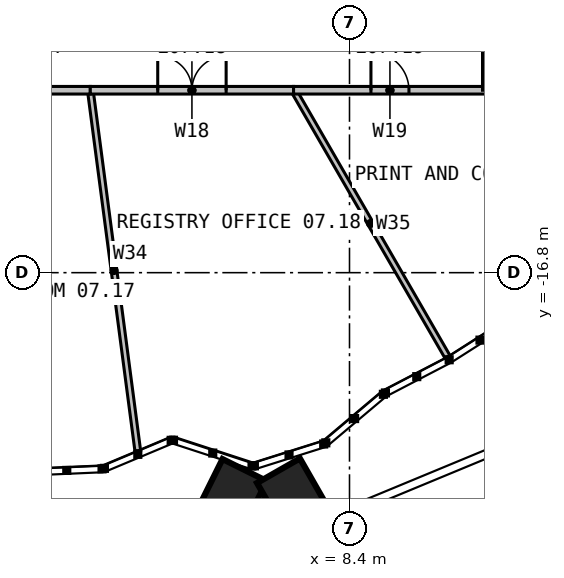
"""IFC4 building model, lengths in metres.
Left out: names, types, materials, properties, quantities, classifications, styles, units other than length and angle.
Written with IfcOpenShell. Run it as: python <this file> out.ifc"""

import sys

from ifc_helpers import new_model, si_unit, direction, frame, frame_2d, origin, place, context, subcontext, project, spatial, rectangle, extrude, element, fill, save


model = new_model("IFC4")
c1 = context("Model", 3, precision=1e-05, world=origin(), true_north=direction((0.0, 1.0)))
c2 = subcontext(c1, "Body", "Model", "MODEL_VIEW")
j1 = project(units=[si_unit("LENGTHUNIT", "METRE"), si_unit("PLANEANGLEUNIT", "RADIAN")], contexts=[c1])
p1 = place(None, origin())
s1 = spatial("IfcSite", under=j1, at=p1, CompositionType="ELEMENT")
p2 = place(p1, origin())
s2 = spatial("IfcBuilding", under=s1, at=p2, CompositionType="ELEMENT")
p3 = place(p2, frame((0.0, 0.0, 33.0)))
s3 = spatial("IfcBuildingStorey", under=s2, at=p3, CompositionType="ELEMENT", Elevation=33.0)
p4 = place(p3, frame((1.58, -12.0, 0.0), z_axis=(0.0, 0.0, 1.0), x_axis=(0.130533729477, -0.991443869046, 0.0)))
e1 = element("IfcWall", 1, at=p4, inside=s3, PredefinedType="PARTITIONING", context=c2, shape_type="SweptSolid", body=[
    extrude(rectangle(XDim=9.567, YDim=0.15, at=frame_2d((4.783, 0.0))), origin(), (0.0, 0.0, 1.0), 2.79),
])
p5 = place(p3, frame((6.928, -12.0, 0.0), z_axis=(0.0, 0.0, 1.0), x_axis=(0.500007814618, -0.866020891966, 0.0)))
e2 = element("IfcWall", 2, at=p5, inside=s3, PredefinedType="PARTITIONING", context=c2, shape_type="SweptSolid", body=[
    extrude(rectangle(XDim=8.097, YDim=0.15, at=frame_2d((4.048, 0.0))), origin(), (0.0, 0.0, 1.0), 2.79),
])
p6 = place(p3, frame((-1.58, -12.0, 0.0), z_axis=(0.0, 0.0, 1.0), x_axis=(1.0, 0.0, 0.0)))
e3 = element("IfcWall", 3, at=p6, inside=s3, PredefinedType="PARTITIONING", context=c2, shape_type="SweptSolid", body=[
    extrude(rectangle(XDim=3.16, YDim=0.2, at=frame_2d((1.58, 0.0))), origin(), (0.0, 0.0, 1.0), 3.8),
])
p7 = place(p6, frame((1.08, 0.0, 0.0)))
e4 = element("IfcOpeningElement", 4, at=p7, cuts=e3, PredefinedType="OPENING", context=c2, shape_type="SweptSolid", body=[
    extrude(rectangle(XDim=1.0, YDim=2.2, at=frame_2d((0.5, 1.1))), frame((0.0, 0.11, 0.0), z_axis=(0.0, -1.0, 0.0), x_axis=(1.0, 0.0, 0.0)), (0.0, 0.0, 1.0), 0.22),
])
p8 = place(p3, frame((1.58, -12.0, 0.0), z_axis=(0.0, 0.0, 1.0), x_axis=(1.0, 0.0, 0.0)))
e5 = element("IfcWall", 5, at=p8, inside=s3, PredefinedType="PARTITIONING", context=c2, shape_type="SweptSolid", body=[
    extrude(rectangle(XDim=5.348, YDim=0.2, at=frame_2d((2.674, 0.0))), origin(), (0.0, 0.0, 1.0), 3.8),
])
p9 = place(p8, frame((1.774, 0.0, 0.0)))
e6 = element("IfcOpeningElement", 6, at=p9, cuts=e5, PredefinedType="OPENING", context=c2, shape_type="SweptSolid", body=[
    extrude(rectangle(XDim=1.8, YDim=2.2, at=frame_2d((0.9, 1.1))), frame((0.0, 0.11, 0.0), z_axis=(0.0, -1.0, 0.0), x_axis=(1.0, 0.0, 0.0)), (0.0, 0.0, 1.0), 0.22),
])
p10 = place(p3, frame((6.928, -12.0, 0.0), z_axis=(0.0, 0.0, 1.0), x_axis=(1.0, 0.0, 0.0)))
e7 = element("IfcWall", 7, at=p10, inside=s3, PredefinedType="PARTITIONING", context=c2, shape_type="SweptSolid", body=[
    extrude(rectangle(XDim=5.072, YDim=0.2, at=frame_2d((2.536, 0.0))), origin(), (0.0, 0.0, 1.0), 3.8),
])
p11 = place(p10, frame((2.036, 0.0, 0.0)))
e8 = element("IfcOpeningElement", 8, at=p11, cuts=e7, PredefinedType="OPENING", context=c2, shape_type="SweptSolid", body=[
    extrude(rectangle(XDim=1.0, YDim=2.2, at=frame_2d((0.5, 1.1))), frame((0.0, 0.11, 0.0), z_axis=(0.0, -1.0, 0.0), x_axis=(1.0, 0.0, 0.0)), (0.0, 0.0, 1.0), 0.22),
])
p12 = place(p3, frame((12.0, -12.0, 0.0), z_axis=(0.0, 0.0, 1.0), x_axis=(0.0, 1.0, 0.0)))
e9 = element("IfcWall", 9, at=p12, inside=s3, PredefinedType="PARTITIONING", context=c2, shape_type="SweptSolid", body=[
    extrude(rectangle(XDim=2.792, YDim=0.2, at=frame_2d((1.396, 0.0))), origin(), (0.0, 0.0, 1.0), 3.8),
])
p13 = place(p9, origin())
e10 = element("IfcDoor", 10, at=p13, inside=s3, OperationType="DOUBLE_DOOR_SINGLE_SWING", PredefinedType="DOOR", context=c2, shape_type="SweptSolid", body=[
    extrude(rectangle(XDim=1.8, YDim=2.2, at=frame_2d((0.9, 1.1))), frame((0.0, 0.025, 0.0), z_axis=(0.0, -1.0, 0.0), x_axis=(1.0, 0.0, 0.0)), (0.0, 0.0, 1.0), 0.05),
])
fill(e6, e10)
p14 = place(p11, origin())
e11 = element("IfcDoor", 11, at=p14, inside=s3, OperationType="SINGLE_SWING_LEFT", PredefinedType="DOOR", context=c2, shape_type="SweptSolid", body=[
    extrude(rectangle(XDim=1.0, YDim=2.2, at=frame_2d((0.5, 1.1))), frame((0.0, 0.025, 0.0), z_axis=(0.0, -1.0, 0.0), x_axis=(1.0, 0.0, 0.0)), (0.0, 0.0, 1.0), 0.05),
])
fill(e8, e11)
save(model, sys.argv[1])
